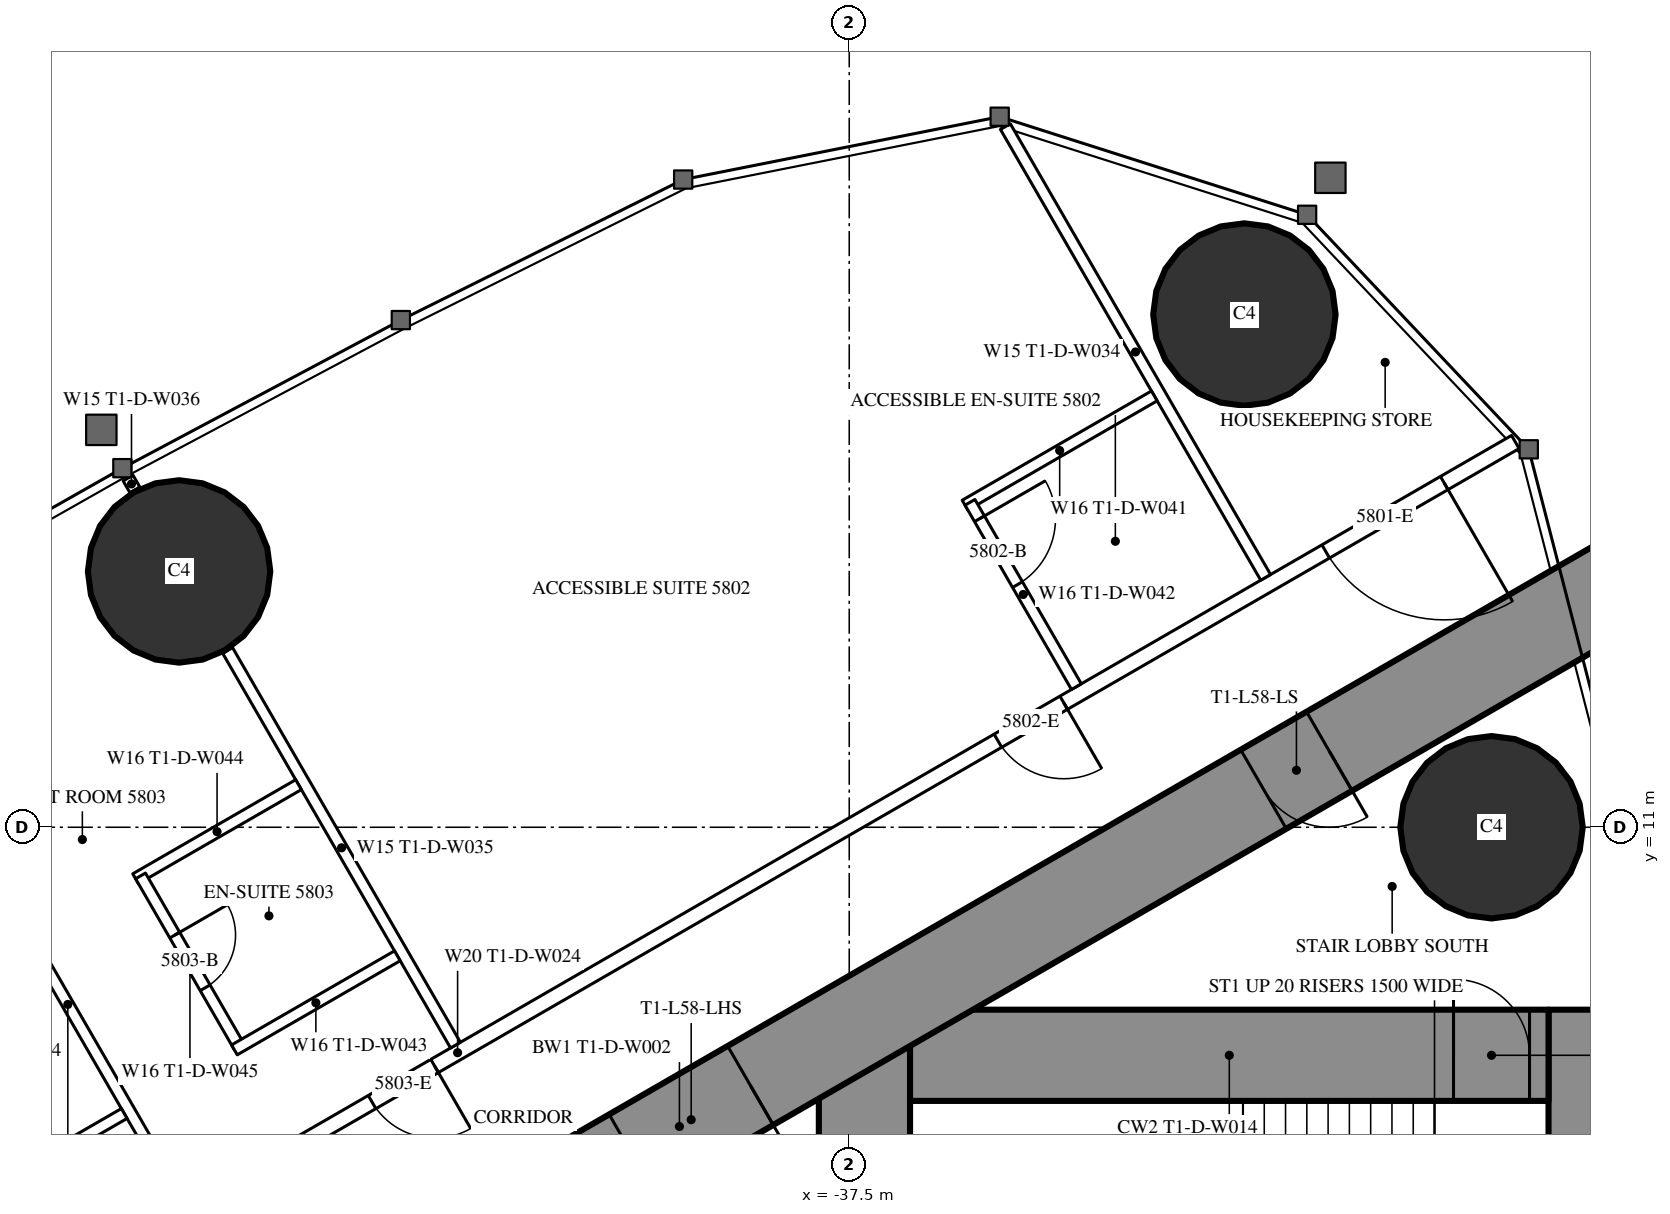
"""IFC4 building model, lengths in metres.
Left out: names, types, materials, properties, quantities, classifications, styles, units other than length and angle.
Written with IfcOpenShell. Run it as: python <this file> out.ifc"""

import sys

from ifc_helpers import new_model, si_unit, direction, frame, frame_2d, origin, origin_2d, place, context, subcontext, project, spatial, rectangle, circle, extrude, element, fill, save


model = new_model("IFC4")
c1 = context("Model", 3, precision=1e-05, world=origin(), true_north=direction((0.0, 1.0)))
c2 = subcontext(c1, "Body", "Model", "MODEL_VIEW")
j1 = project(units=[si_unit("LENGTHUNIT", "METRE"), si_unit("PLANEANGLEUNIT", "RADIAN")], contexts=[c1])
p1 = place(None, origin())
s1 = spatial("IfcSite", under=j1, at=p1, CompositionType="ELEMENT")
p2 = place(p1, origin())
s2 = spatial("IfcBuilding", under=s1, at=p2, CompositionType="ELEMENT")
p3 = place(p2, frame((0.0, 0.0, 218.9)))
s3 = spatial("IfcBuildingStorey", under=s2, at=p3, CompositionType="ELEMENT", Elevation=218.9)
for number, where, z_axis, x_axis in (
    (1, (-32.301, 17.745, 0.0), (0.0, 0.0, 1.0), (1.0, 0.0, 0.0)),
    (2, (-29.05, 11.0, 0.0), (0.0, 0.0, 1.0), (1.0, 0.0, 0.0)),
    (3, (-46.317, 14.365, 0.0), (0.0, 0.0, 1.0), (1.0, 0.0, 0.0)),
):
    element("IfcColumn", number, at=place(p3, frame(where, z_axis=z_axis, x_axis=x_axis)), inside=s3, PredefinedType="COLUMN", context=c2, shape_type="SweptSolid", body=[
        extrude(circle(Radius=1.2, at=origin_2d()), origin(), (0.0, 0.0, 1.0), 3.6),
    ])
p4 = place(p3, frame((-27.9, 8.6, 0.0), z_axis=(0.0, 0.0, 1.0), x_axis=(0.0, -1.0, 0.0)))
e4 = element("IfcWall", 4, at=p4, inside=s3, PredefinedType="SHEAR", context=c2, shape_type="SweptSolid", body=[
    extrude(rectangle(XDim=17.2, YDim=0.8, at=frame_2d((8.6, 0.0))), origin(), (0.0, 0.0, 1.0), 3.6),
])
p5 = place(p4, frame((6.95, 0.0, 0.0)))
e5 = element("IfcOpeningElement", 5, at=p5, cuts=e4, PredefinedType="OPENING", context=c2, shape_type="SweptSolid", body=[
    extrude(rectangle(XDim=0.9, YDim=2.2, at=frame_2d((0.45, 1.1))), frame((0.0, 0.41, 0.0), z_axis=(0.0, -1.0, 0.0), x_axis=(1.0, 0.0, 0.0)), (0.0, 0.0, 1.0), 0.82),
])
p6 = place(p3, frame((-37.3, 8.6, 0.0), z_axis=(0.0, 0.0, 1.0), x_axis=(0.0, -1.0, 0.0)))
e6 = element("IfcWall", 6, at=p6, inside=s3, PredefinedType="SHEAR", context=c2, shape_type="SweptSolid", body=[
    extrude(rectangle(XDim=17.2, YDim=1.2, at=frame_2d((8.6, 0.0))), origin(), (0.0, 0.0, 1.0), 3.6),
])
p7 = place(p6, frame((7.7, 0.0, 0.0)))
e7 = element("IfcOpeningElement", 7, at=p7, cuts=e6, PredefinedType="OPENING", context=c2, shape_type="SweptSolid", body=[
    extrude(rectangle(XDim=1.8, YDim=2.2, at=frame_2d((0.9, 1.1))), frame((0.0, 0.61, 0.0), z_axis=(0.0, -1.0, 0.0), x_axis=(1.0, 0.0, 0.0)), (0.0, 0.0, 1.0), 1.22),
])
p8 = place(p3, frame((-28.3, 8.0, 0.0), z_axis=(0.0, 0.0, 1.0), x_axis=(-1.0, 0.0, 0.0)))
e8 = element("IfcWall", 8, at=p8, inside=s3, PredefinedType="SHEAR", context=c2, shape_type="SweptSolid", body=[
    extrude(rectangle(XDim=8.4, YDim=1.2, at=frame_2d((4.2, 0.0))), origin(), (0.0, 0.0, 1.0), 3.6),
])
p9 = place(p8, frame((0.25, 0.0, 0.0)))
e9 = element("IfcOpeningElement", 9, at=p9, cuts=e8, PredefinedType="OPENING", context=c2, shape_type="SweptSolid", body=[
    extrude(rectangle(XDim=1.0, YDim=2.2, at=frame_2d((0.5, 1.1))), frame((0.0, 0.61, 0.0), z_axis=(0.0, -1.0, 0.0), x_axis=(1.0, 0.0, 0.0)), (0.0, 0.0, 1.0), 1.22),
])
p10 = place(p3, frame((-27.2, 14.3, 0.0), z_axis=(0.0, 0.0, 1.0), x_axis=(-0.866026593062, -0.499997940104, 0.0)))
e10 = element("IfcWall", 10, at=p10, inside=s3, PredefinedType="SHEAR", context=c2, shape_type="SweptSolid", body=[
    extrude(rectangle(XDim=28.946, YDim=1.2, at=frame_2d((14.473, 0.0))), origin(), (0.0, 0.0, 1.0), 3.6),
])
p11 = place(p10, frame((4.6, 0.0, 0.0)))
e11 = element("IfcOpeningElement", 11, at=p11, cuts=e10, PredefinedType="OPENING", context=c2, shape_type="SweptSolid", body=[
    extrude(rectangle(XDim=1.0, YDim=2.2, at=frame_2d((0.5, 1.1))), frame((0.0, 0.61, 0.0), z_axis=(0.0, -1.0, 0.0), x_axis=(1.0, 0.0, 0.0)), (0.0, 0.0, 1.0), 1.22),
])
p12 = place(p10, frame((13.395, 0.0, 0.0)))
e12 = element("IfcOpeningElement", 12, at=p12, cuts=e10, PredefinedType="OPENING", context=c2, shape_type="SweptSolid", body=[
    extrude(rectangle(XDim=1.8, YDim=2.2, at=frame_2d((0.9, 1.1))), frame((0.0, 0.61, 0.0), z_axis=(0.0, -1.0, 0.0), x_axis=(1.0, 0.0, 0.0)), (0.0, 0.0, 1.0), 1.22),
])
p13 = place(p3, frame((-28.737, 16.068, 0.0), z_axis=(0.0, 0.0, 1.0), x_axis=(-0.866026057212, -0.499998868229, 0.0)))
e13 = element("IfcWall", 13, at=p13, inside=s3, PredefinedType="PARTITIONING", context=c2, shape_type="SweptSolid", body=[
    extrude(rectangle(XDim=32.137, YDim=0.2, at=frame_2d((16.068, 0.0))), origin(), (0.0, 0.0, 1.0), 3.35),
])
p14 = place(p13, frame((1.08, 0.0, 0.0)))
e14 = element("IfcOpeningElement", 14, at=p14, cuts=e13, PredefinedType="OPENING", context=c2, shape_type="SweptSolid", body=[
    extrude(rectangle(XDim=1.8, YDim=2.03, at=frame_2d((0.9, 1.015))), frame((0.0, 0.11, 0.0), z_axis=(0.0, -1.0, 0.0), x_axis=(1.0, 0.0, 0.0)), (0.0, 0.0, 1.0), 0.22),
])
p15 = place(p13, frame((6.86, 0.0, 0.0)))
e15 = element("IfcOpeningElement", 15, at=p15, cuts=e13, PredefinedType="OPENING", context=c2, shape_type="SweptSolid", body=[
    extrude(rectangle(XDim=1.0, YDim=2.2, at=frame_2d((0.5, 1.1))), frame((0.0, 0.11, 0.0), z_axis=(0.0, -1.0, 0.0), x_axis=(1.0, 0.0, 0.0)), (0.0, 0.0, 1.0), 0.22),
])
p16 = place(p13, frame((16.418, 0.0, 0.0)))
e16 = element("IfcOpeningElement", 16, at=p16, cuts=e13, PredefinedType="OPENING", context=c2, shape_type="SweptSolid", body=[
    extrude(rectangle(XDim=0.95, YDim=2.2, at=frame_2d((0.475, 1.1))), frame((0.0, 0.11, 0.0), z_axis=(0.0, -1.0, 0.0), x_axis=(1.0, 0.0, 0.0)), (0.0, 0.0, 1.0), 0.22),
])
p17 = place(p13, frame((20.567, 0.0, 0.0)))
e17 = element("IfcOpeningElement", 17, at=p17, cuts=e13, PredefinedType="OPENING", context=c2, shape_type="SweptSolid", body=[
    extrude(rectangle(XDim=0.95, YDim=2.2, at=frame_2d((0.475, 1.1))), frame((0.0, 0.11, 0.0), z_axis=(0.0, -1.0, 0.0), x_axis=(1.0, 0.0, 0.0)), (0.0, 0.0, 1.0), 0.22),
])
p18 = place(p13, frame((27.065, 0.0, 0.0)))
e18 = element("IfcOpeningElement", 18, at=p18, cuts=e13, PredefinedType="OPENING", context=c2, shape_type="SweptSolid", body=[
    extrude(rectangle(XDim=0.95, YDim=2.2, at=frame_2d((0.475, 1.1))), frame((0.0, 0.11, 0.0), z_axis=(0.0, -1.0, 0.0), x_axis=(1.0, 0.0, 0.0)), (0.0, 0.0, 1.0), 0.22),
])
p19 = place(p3, frame((-32.022, 14.287, 0.0), z_axis=(0.0, 0.0, 1.0), x_axis=(-0.50000019414, 0.866025291697, 0.0)))
e19 = element("IfcWall", 19, at=p19, inside=s3, PredefinedType="PARTITIONING", context=c2, shape_type="SweptSolid", body=[
    extrude(rectangle(XDim=6.848, YDim=0.15, at=frame_2d((3.424, 0.0))), origin(), (0.0, 0.0, 1.0), 3.35),
])
p20 = place(p3, frame((-42.68, 8.134, 0.0), z_axis=(0.0, 0.0, 1.0), x_axis=(-0.499984479505, 0.866034364361, 0.0)))
e20 = element("IfcWall", 20, at=p20, inside=s3, PredefinedType="PARTITIONING", context=c2, shape_type="SweptSolid", body=[
    extrude(rectangle(XDim=5.995, YDim=0.15, at=frame_2d((2.998, 0.0))), origin(), (0.0, 0.0, 1.0), 2.45),
])
p21 = place(p3, frame((-46.898, 15.439, 0.0), z_axis=(0.0, 0.0, 1.0), x_axis=(-0.500232303069, 0.865891241997, 0.0)))
e21 = element("IfcWall", 21, at=p21, inside=s3, PredefinedType="PARTITIONING", context=c2, shape_type="SweptSolid", body=[
    extrude(rectangle(XDim=0.18, YDim=0.15, at=frame_2d((0.09, 0.0))), origin(), (0.0, 0.0, 1.0), 2.45),
])
p22 = place(p3, frame((-46.274, 6.059, 0.0), z_axis=(0.0, 0.0, 1.0), x_axis=(-0.500020471368, 0.866013584312, 0.0)))
e22 = element("IfcWall", 22, at=p22, inside=s3, PredefinedType="PARTITIONING", context=c2, shape_type="SweptSolid", body=[
    extrude(rectangle(XDim=6.028, YDim=0.15, at=frame_2d((3.014, 0.0))), origin(), (0.0, 0.0, 1.0), 2.45),
])
p23 = place(p3, frame((-33.487, 16.675, 0.0), z_axis=(0.0, 0.0, 1.0), x_axis=(-0.866039941686, -0.499974818771, 0.0)))
e23 = element("IfcWall", 23, at=p23, inside=s3, PredefinedType="PARTITIONING", context=c2, shape_type="SweptSolid", body=[
    extrude(rectangle(XDim=2.875, YDim=0.15, at=frame_2d((1.438, 0.0))), origin(), (0.0, 0.0, 1.0), 3.35),
])
p24 = place(p3, frame((-34.511, 12.85, 0.0), z_axis=(0.0, 0.0, 1.0), x_axis=(-0.500011755427, 0.866018616679, 0.0)))
e24 = element("IfcWall", 24, at=p24, inside=s3, PredefinedType="PARTITIONING", context=c2, shape_type="SweptSolid", body=[
    extrude(rectangle(XDim=2.8, YDim=0.15, at=frame_2d((1.4, 0.0))), origin(), (0.0, 0.0, 1.0), 3.35),
])
p25 = place(p24, frame((1.55, 0.0, 0.0)))
e25 = element("IfcOpeningElement", 25, at=p25, cuts=e24, PredefinedType="OPENING", context=c2, shape_type="SweptSolid", body=[
    extrude(rectangle(XDim=1.0, YDim=2.2, at=frame_2d((0.5, 1.1))), frame((0.0, 0.085, 0.0), z_axis=(0.0, -1.0, 0.0), x_axis=(1.0, 0.0, 0.0)), (0.0, 0.0, 1.0), 0.17),
])
p26 = place(p3, frame((-44.745, 11.56, 0.0), z_axis=(0.0, 0.0, 1.0), x_axis=(-0.866006523861, -0.500032699561, 0.0)))
e26 = element("IfcWall", 26, at=p26, inside=s3, PredefinedType="PARTITIONING", context=c2, shape_type="SweptSolid", body=[
    extrude(rectangle(XDim=2.475, YDim=0.15, at=frame_2d((1.237, 0.0))), origin(), (0.0, 0.0, 1.0), 3.35),
])
p27 = place(p3, frame((-45.524, 8.109, 0.0), z_axis=(0.0, 0.0, 1.0), x_axis=(-0.49997716683, 0.86603858612, 0.0)))
e27 = element("IfcWall", 27, at=p27, inside=s3, PredefinedType="PARTITIONING", context=c2, shape_type="SweptSolid", body=[
    extrude(rectangle(XDim=2.6, YDim=0.15, at=frame_2d((1.3, 0.0))), origin(), (0.0, 0.0, 1.0), 3.35),
])
p28 = place(p27, frame((0.9, 0.0, 0.0)))
e28 = element("IfcOpeningElement", 28, at=p28, cuts=e27, PredefinedType="OPENING", context=c2, shape_type="SweptSolid", body=[
    extrude(rectangle(XDim=0.8, YDim=2.2, at=frame_2d((0.4, 1.1))), frame((0.0, 0.085, 0.0), z_axis=(0.0, -1.0, 0.0), x_axis=(1.0, 0.0, 0.0)), (0.0, 0.0, 1.0), 0.17),
])
for number, where, z_axis, x_axis in (
    (29, (-43.445, 9.309, 0.0), (0.0, 0.0, 1.0), (-0.866, -0.5, 0.0)),
    (30, (-47.039, 7.234, 0.0), (0.0, 0.0, 1.0), (-0.866, -0.5, 0.0)),
):
    element("IfcWall", number, at=place(p3, frame(where, z_axis=z_axis, x_axis=x_axis)), inside=s3, PredefinedType="PARTITIONING", context=c2, shape_type="SweptSolid", body=[
        extrude(rectangle(XDim=2.475, YDim=0.15, at=frame_2d((1.238, 0.0))), origin(), (0.0, 0.0, 1.0), 3.35),
    ])
p29 = place(p14, origin())
e31 = element("IfcDoor", 31, at=p29, inside=s3, OperationType="DOUBLE_DOOR_SINGLE_SWING", PredefinedType="DOOR", context=c2, shape_type="SweptSolid", body=[
    extrude(rectangle(XDim=1.8, YDim=2.03, at=frame_2d((0.9, 1.015))), frame((0.0, 0.025, 0.0), z_axis=(0.0, -1.0, 0.0), x_axis=(1.0, 0.0, 0.0)), (0.0, 0.0, 1.0), 0.05),
])
fill(e14, e31)
p30 = place(p25, origin())
e32 = element("IfcDoor", 32, at=p30, inside=s3, OperationType="SINGLE_SWING_RIGHT", PredefinedType="DOOR", context=c2, shape_type="SweptSolid", body=[
    extrude(rectangle(XDim=1.0, YDim=2.2, at=frame_2d((0.5, 1.1))), frame((0.0, 0.025, 0.0), z_axis=(0.0, -1.0, 0.0), x_axis=(1.0, 0.0, 0.0)), (0.0, 0.0, 1.0), 0.05),
])
fill(e25, e32)
p31 = place(p15, origin())
e33 = element("IfcDoor", 33, at=p31, inside=s3, OperationType="SINGLE_SWING_LEFT", PredefinedType="DOOR", context=c2, shape_type="SweptSolid", body=[
    extrude(rectangle(XDim=1.0, YDim=2.2, at=frame_2d((0.5, 1.1))), frame((0.0, 0.025, 0.0), z_axis=(0.0, -1.0, 0.0), x_axis=(1.0, 0.0, 0.0)), (0.0, 0.0, 1.0), 0.05),
])
fill(e15, e33)
p32 = place(p28, origin())
e34 = element("IfcDoor", 34, at=p32, inside=s3, OperationType="SINGLE_SWING_RIGHT", PredefinedType="DOOR", context=c2, shape_type="SweptSolid", body=[
    extrude(rectangle(XDim=0.8, YDim=2.2, at=frame_2d((0.4, 1.1))), frame((0.0, 0.025, 0.0), z_axis=(0.0, -1.0, 0.0), x_axis=(1.0, 0.0, 0.0)), (0.0, 0.0, 1.0), 0.05),
])
fill(e28, e34)
p33 = place(p16, origin())
e35 = element("IfcDoor", 35, at=p33, inside=s3, OperationType="SINGLE_SWING_LEFT", PredefinedType="DOOR", context=c2, shape_type="SweptSolid", body=[
    extrude(rectangle(XDim=0.95, YDim=2.2, at=frame_2d((0.475, 1.1))), frame((0.0, 0.025, 0.0), z_axis=(0.0, -1.0, 0.0), x_axis=(1.0, 0.0, 0.0)), (0.0, 0.0, 1.0), 0.05),
])
fill(e16, e35)
p34 = place(p11, origin())
e36 = element("IfcDoor", 36, at=p34, inside=s3, OperationType="SINGLE_SWING_LEFT", PredefinedType="DOOR", context=c2, shape_type="SweptSolid", body=[
    extrude(rectangle(XDim=1.0, YDim=2.2, at=frame_2d((0.5, 1.1))), frame((0.0, 0.025, 0.0), z_axis=(0.0, -1.0, 0.0), x_axis=(1.0, 0.0, 0.0)), (0.0, 0.0, 1.0), 0.05),
])
fill(e11, e36)
p35 = place(p12, origin())
e37 = element("IfcDoor", 37, at=p35, inside=s3, OperationType="DOUBLE_DOOR_SINGLE_SWING", PredefinedType="DOOR", context=c2, shape_type="SweptSolid", body=[
    extrude(rectangle(XDim=1.8, YDim=2.2, at=frame_2d((0.9, 1.1))), frame((0.0, 0.025, 0.0), z_axis=(0.0, -1.0, 0.0), x_axis=(1.0, 0.0, 0.0)), (0.0, 0.0, 1.0), 0.05),
])
fill(e12, e37)
p36 = place(p9, origin())
e38 = element("IfcDoor", 38, at=p36, inside=s3, OperationType="SINGLE_SWING_RIGHT", PredefinedType="DOOR", context=c2, shape_type="SweptSolid", body=[
    extrude(rectangle(XDim=1.0, YDim=2.2, at=frame_2d((0.5, 1.1))), frame((0.0, 0.025, 0.0), z_axis=(0.0, -1.0, 0.0), x_axis=(1.0, 0.0, 0.0)), (0.0, 0.0, 1.0), 0.05),
])
fill(e9, e38)
save(model, sys.argv[1])
